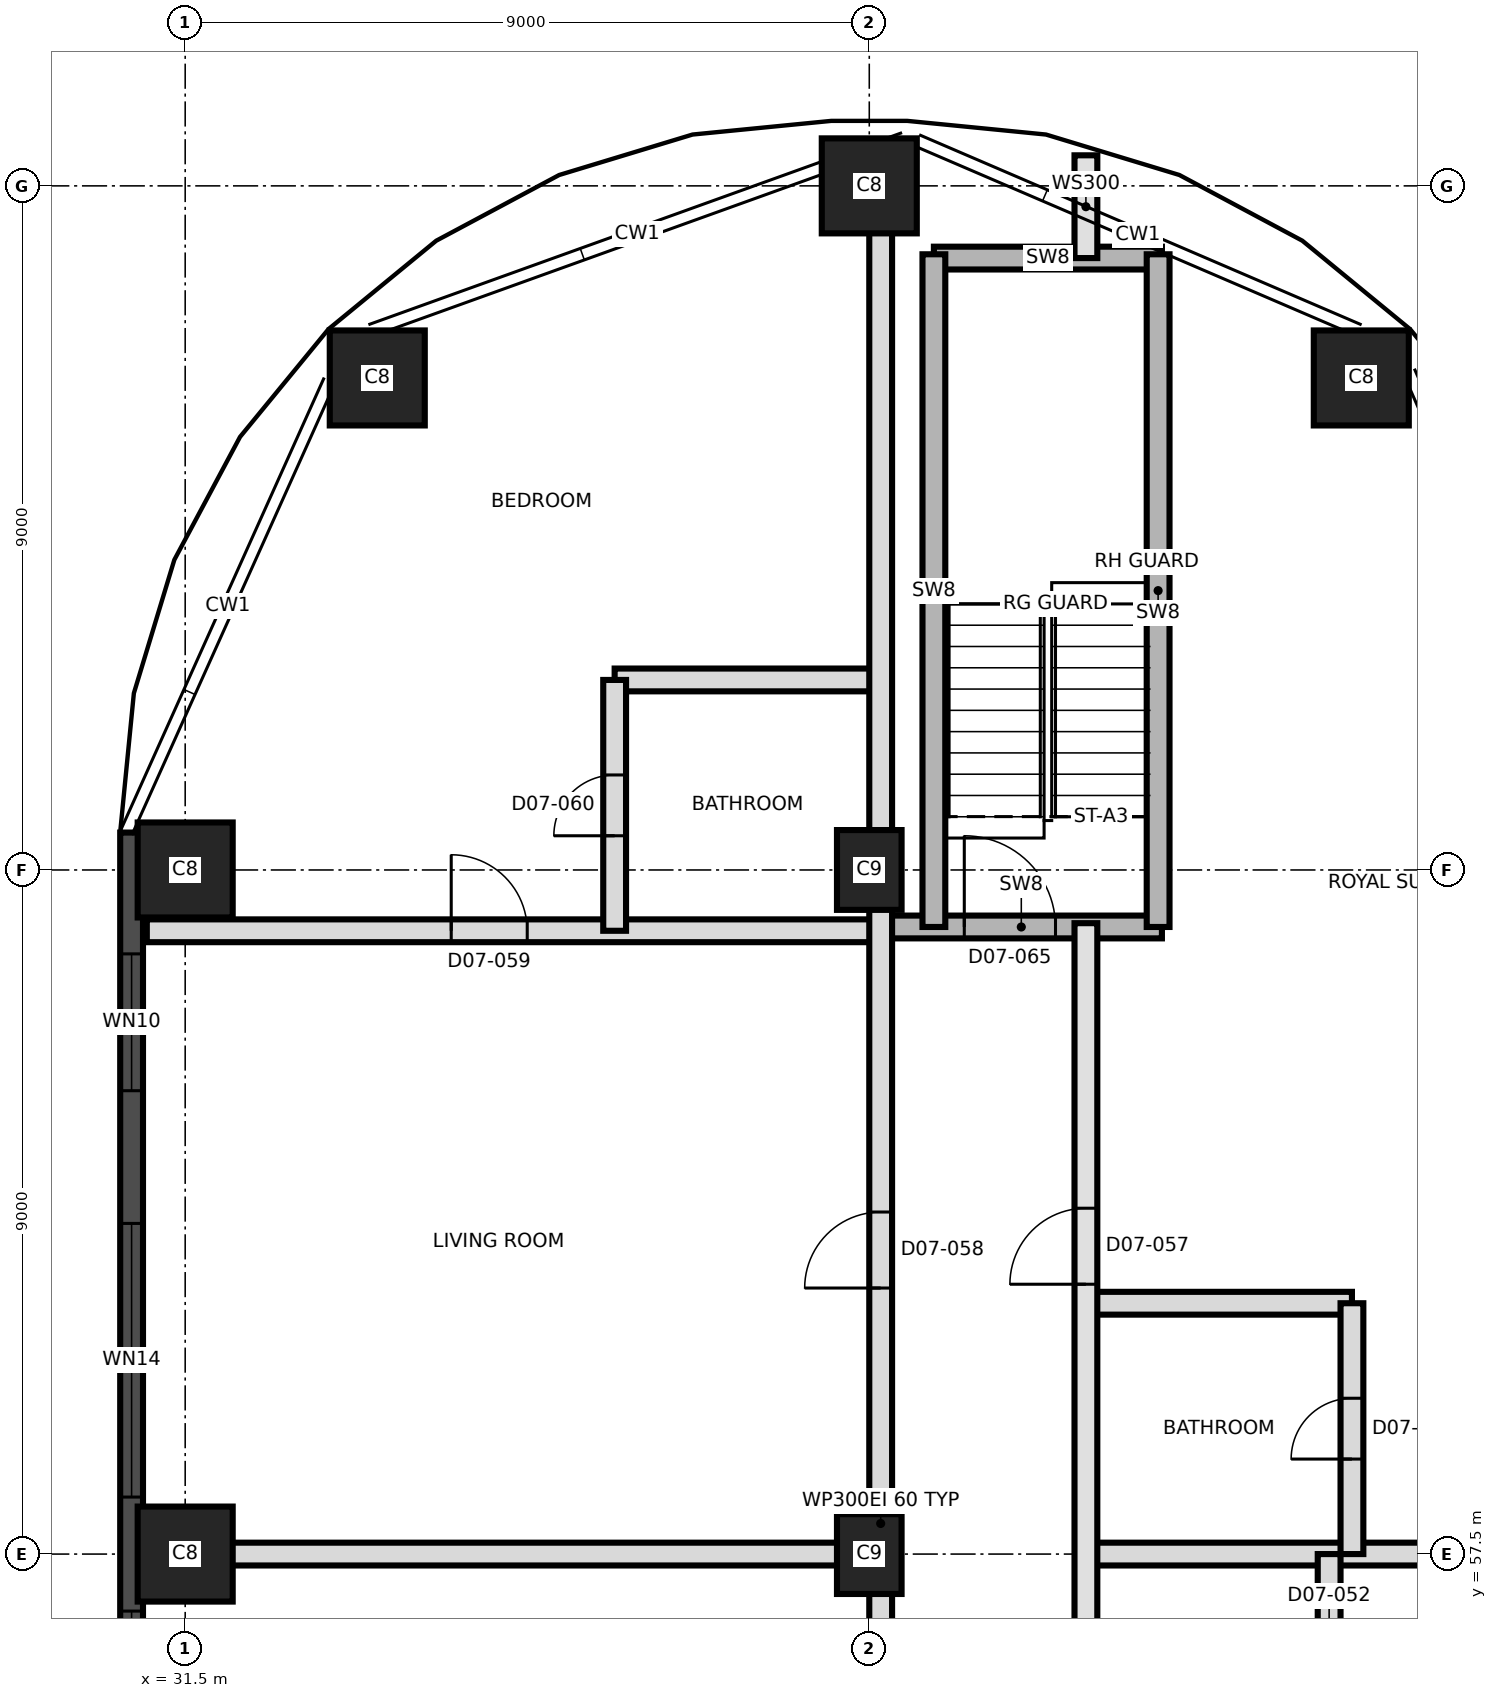
"""IFC4 building model, lengths in metres.
Left out: names, types, materials, properties, quantities, classifications, styles, units other than length and angle.
Written with IfcOpenShell. Run it as: python <this file> out.ifc"""

import sys

from ifc_helpers import new_model, si_unit, direction, frame, frame_2d, origin, origin_2d, place, context, subcontext, project, spatial, rectangle, extrude, element, fill, save


model = new_model("IFC4")
c1 = context("Model", 3, precision=1e-05, world=origin(), true_north=direction((0.0, 1.0)))
c2 = subcontext(c1, "Body", "Model", "MODEL_VIEW")
j1 = project(units=[si_unit("LENGTHUNIT", "METRE"), si_unit("PLANEANGLEUNIT", "RADIAN")], contexts=[c1])
p1 = place(None, origin())
s1 = spatial("IfcSite", under=j1, at=p1, CompositionType="ELEMENT")
p2 = place(p1, origin())
s2 = spatial("IfcBuilding", under=s1, at=p2, CompositionType="ELEMENT")
p3 = place(p2, frame((0.0, 0.0, 87.1)))
s3 = spatial("IfcBuildingStorey", under=s2, at=p3, CompositionType="ELEMENT", Elevation=87.1)
p4 = place(p3, frame((31.5, 57.5, 0.0), z_axis=(0.0, 0.0, 1.0), x_axis=(1.0, 0.0, 0.0)))
e1 = element("IfcColumn", 1, at=p4, inside=s3, PredefinedType="COLUMN", context=c2, shape_type="SweptSolid", body=[
    extrude(rectangle(XDim=1.25, YDim=1.25, at=origin_2d()), origin(), (0.0, 0.0, 1.0), 3.7),
])
p5 = place(p3, frame((40.5, 57.5, 0.0), z_axis=(0.0, 0.0, 1.0), x_axis=(0.0, 1.0, 0.0)))
e2 = element("IfcColumn", 2, at=p5, inside=s3, PredefinedType="COLUMN", context=c2, shape_type="SweptSolid", body=[
    extrude(rectangle(XDim=1.05, YDim=0.85, at=origin_2d()), origin(), (0.0, 0.0, 1.0), 3.7),
])
p6 = place(p3, frame((31.5, 66.5, 0.0), z_axis=(0.0, 0.0, 1.0), x_axis=(1.0, 0.0, 0.0)))
e3 = element("IfcColumn", 3, at=p6, inside=s3, PredefinedType="COLUMN", context=c2, shape_type="SweptSolid", body=[
    extrude(rectangle(XDim=1.25, YDim=1.25, at=origin_2d()), origin(), (0.0, 0.0, 1.0), 3.7),
])
p7 = place(p3, frame((40.5, 66.5, 0.0), z_axis=(0.0, 0.0, 1.0), x_axis=(0.0, 1.0, 0.0)))
e4 = element("IfcColumn", 4, at=p7, inside=s3, PredefinedType="COLUMN", context=c2, shape_type="SweptSolid", body=[
    extrude(rectangle(XDim=1.05, YDim=0.85, at=origin_2d()), origin(), (0.0, 0.0, 1.0), 3.7),
])
for number, where, z_axis, x_axis in (
    (5, (34.027, 72.973, 0.0), (0.0, 0.0, 1.0), (1.0, 0.0, 0.0)),
    (6, (46.973, 72.973, 0.0), (0.0, 0.0, 1.0), (1.0, 0.0, 0.0)),
    (7, (40.5, 75.5, 0.0), (0.0, 0.0, 1.0), (1.0, 0.0, 0.0)),
):
    element("IfcColumn", number, at=place(p3, frame(where, z_axis=z_axis, x_axis=x_axis)), inside=s3, PredefinedType="COLUMN", context=c2, shape_type="SweptSolid", body=[
        extrude(rectangle(XDim=1.25, YDim=1.25, at=origin_2d()), origin(), (0.0, 0.0, 1.0), 3.7),
    ])
p8 = place(p3, frame((30.795, 66.992, 0.0), z_axis=(0.0, 0.0, 1.0), x_axis=(0.0, -1.0, 0.0)))
e8 = element("IfcWall", 8, at=p8, inside=s3, PredefinedType="SOLIDWALL", context=c2, shape_type="SweptSolid", body=[
    extrude(rectangle(XDim=32.981, YDim=0.3, at=frame_2d((16.491, 0.0))), origin(), (0.0, 0.0, 1.0), 3.4),
])
p9 = place(p8, frame((1.596, 0.0, 0.3)))
e9 = element("IfcOpeningElement", 9, at=p9, cuts=e8, PredefinedType="OPENING", context=c2, shape_type="SweptSolid", body=[
    extrude(rectangle(XDim=1.8, YDim=2.4, at=frame_2d((0.9, 1.2))), frame((0.0, 0.16, 0.0), z_axis=(0.0, -1.0, 0.0), x_axis=(1.0, 0.0, 0.0)), (0.0, 0.0, 1.0), 0.32),
])
p10 = place(p8, frame((5.142, 0.0, 0.9)))
e10 = element("IfcOpeningElement", 10, at=p10, cuts=e8, PredefinedType="OPENING", context=c2, shape_type="SweptSolid", body=[
    extrude(rectangle(XDim=3.6, YDim=1.7, at=frame_2d((1.8, 0.85))), frame((0.0, 0.16, 0.0), z_axis=(0.0, -1.0, 0.0), x_axis=(1.0, 0.0, 0.0)), (0.0, 0.0, 1.0), 0.32),
])
p11 = place(p8, frame((10.242, 0.0, 0.9)))
e11 = element("IfcOpeningElement", 11, at=p11, cuts=e8, PredefinedType="OPENING", context=c2, shape_type="SweptSolid", body=[
    extrude(rectangle(XDim=3.6, YDim=1.7, at=frame_2d((1.8, 0.85))), frame((0.0, 0.16, 0.0), z_axis=(0.0, -1.0, 0.0), x_axis=(1.0, 0.0, 0.0)), (0.0, 0.0, 1.0), 0.32),
])
p12 = place(p8, frame((14.142, 0.0, 0.9)))
e12 = element("IfcOpeningElement", 12, at=p12, cuts=e8, PredefinedType="OPENING", context=c2, shape_type="SweptSolid", body=[
    extrude(rectangle(XDim=3.6, YDim=1.7, at=frame_2d((1.8, 0.85))), frame((0.0, 0.16, 0.0), z_axis=(0.0, -1.0, 0.0), x_axis=(1.0, 0.0, 0.0)), (0.0, 0.0, 1.0), 0.32),
])
p13 = place(p8, frame((19.242, 0.0, 0.9)))
e13 = element("IfcOpeningElement", 13, at=p13, cuts=e8, PredefinedType="OPENING", context=c2, shape_type="SweptSolid", body=[
    extrude(rectangle(XDim=3.6, YDim=1.7, at=frame_2d((1.8, 0.85))), frame((0.0, 0.16, 0.0), z_axis=(0.0, -1.0, 0.0), x_axis=(1.0, 0.0, 0.0)), (0.0, 0.0, 1.0), 0.32),
])
p14 = place(p8, frame((23.142, 0.0, 0.9)))
e14 = element("IfcOpeningElement", 14, at=p14, cuts=e8, PredefinedType="OPENING", context=c2, shape_type="SweptSolid", body=[
    extrude(rectangle(XDim=4.2, YDim=1.7, at=frame_2d((2.1, 0.85))), frame((0.0, 0.16, 0.0), z_axis=(0.0, -1.0, 0.0), x_axis=(1.0, 0.0, 0.0)), (0.0, 0.0, 1.0), 0.32),
])
p15 = place(p8, frame((29.337, 0.0, 0.3)))
e15 = element("IfcOpeningElement", 15, at=p15, cuts=e8, PredefinedType="OPENING", context=c2, shape_type="SweptSolid", body=[
    extrude(rectangle(XDim=1.8, YDim=2.4, at=frame_2d((0.9, 1.2))), frame((0.0, 0.16, 0.0), z_axis=(0.0, -1.0, 0.0), x_axis=(1.0, 0.0, 0.0)), (0.0, 0.0, 1.0), 0.32),
])
p16 = place(p3, frame((30.995, 57.5, 0.0), z_axis=(0.0, 0.0, 1.0), x_axis=(1.0, 0.0, 0.0)))
e16 = element("IfcWall", 16, at=p16, inside=s3, PredefinedType="PARTITIONING", context=c2, shape_type="SweptSolid", body=[
    extrude(rectangle(XDim=9.655, YDim=0.3, at=frame_2d((4.827, 0.0))), origin(), (0.0, 0.0, 1.0), 3.4),
])
p17 = place(p3, frame((43.35, 57.5, 0.0), z_axis=(0.0, 0.0, 1.0), x_axis=(1.0, 0.0, 0.0)))
e17 = element("IfcWall", 17, at=p17, inside=s3, PredefinedType="PARTITIONING", context=c2, shape_type="SweptSolid", body=[
    extrude(rectangle(XDim=6.655, YDim=0.3, at=frame_2d((3.327, 0.0))), origin(), (0.0, 0.0, 1.0), 3.4),
])
p18 = place(p3, frame((43.35, 60.8, 0.0), z_axis=(0.0, 0.0, 1.0), x_axis=(1.0, 0.0, 0.0)))
e18 = element("IfcWall", 18, at=p18, inside=s3, PredefinedType="PARTITIONING", context=c2, shape_type="SweptSolid", body=[
    extrude(rectangle(XDim=3.5, YDim=0.3, at=frame_2d((1.75, 0.0))), origin(), (0.0, 0.0, 1.0), 3.4),
])
p19 = place(p3, frame((30.995, 65.7, 0.0), z_axis=(0.0, 0.0, 1.0), x_axis=(1.0, 0.0, 0.0)))
e19 = element("IfcWall", 19, at=p19, inside=s3, PredefinedType="PARTITIONING", context=c2, shape_type="SweptSolid", body=[
    extrude(rectangle(XDim=9.655, YDim=0.3, at=frame_2d((4.827, 0.0))), origin(), (0.0, 0.0, 1.0), 3.4),
])
p20 = place(p19, frame((4.005, 0.0, 0.0)))
e20 = element("IfcOpeningElement", 20, at=p20, cuts=e19, PredefinedType="OPENING", context=c2, shape_type="SweptSolid", body=[
    extrude(rectangle(XDim=1.0, YDim=2.1, at=frame_2d((0.5, 1.05))), frame((0.0, 0.16, 0.0), z_axis=(0.0, -1.0, 0.0), x_axis=(1.0, 0.0, 0.0)), (0.0, 0.0, 1.0), 0.32),
])
p21 = place(p3, frame((40.65, 65.75, 0.0), z_axis=(0.0, 0.0, 1.0), x_axis=(1.0, 0.0, 0.0)))
e21 = element("IfcWall", 21, at=p21, inside=s3, PredefinedType="SHEAR", context=c2, shape_type="SweptSolid", body=[
    extrude(rectangle(XDim=3.7, YDim=0.3, at=frame_2d((1.85, 0.0))), origin(), (0.0, 0.0, 1.0), 3.4),
])
p22 = place(p21, frame((1.1, 0.0, 0.0)))
e22 = element("IfcOpeningElement", 22, at=p22, cuts=e21, PredefinedType="OPENING", context=c2, shape_type="SweptSolid", body=[
    extrude(rectangle(XDim=1.2, YDim=2.1, at=frame_2d((0.6, 1.05))), frame((0.0, 0.16, 0.0), z_axis=(0.0, -1.0, 0.0), x_axis=(1.0, 0.0, 0.0)), (0.0, 0.0, 1.0), 0.32),
])
p23 = place(p3, frame((37.15, 69.0, 0.0), z_axis=(0.0, 0.0, 1.0), x_axis=(1.0, 0.0, 0.0)))
e23 = element("IfcWall", 23, at=p23, inside=s3, PredefinedType="PARTITIONING", context=c2, shape_type="SweptSolid", body=[
    extrude(rectangle(XDim=3.5, YDim=0.3, at=frame_2d((1.75, 0.0))), origin(), (0.0, 0.0, 1.0), 3.4),
])
p24 = place(p3, frame((41.35, 74.55, 0.0), z_axis=(0.0, 0.0, 1.0), x_axis=(1.0, 0.0, 0.0)))
e24 = element("IfcWall", 24, at=p24, inside=s3, PredefinedType="SHEAR", context=c2, shape_type="SweptSolid", body=[
    extrude(rectangle(XDim=3.0, YDim=0.3, at=frame_2d((1.5, 0.0))), origin(), (0.0, 0.0, 1.0), 3.4),
])
p25 = place(p3, frame((37.15, 65.7, 0.0), z_axis=(0.0, 0.0, 1.0), x_axis=(0.0, 1.0, 0.0)))
e25 = element("IfcWall", 25, at=p25, inside=s3, PredefinedType="PARTITIONING", context=c2, shape_type="SweptSolid", body=[
    extrude(rectangle(XDim=3.3, YDim=0.3, at=frame_2d((1.65, 0.0))), origin(), (0.0, 0.0, 1.0), 3.4),
])
p26 = place(p25, frame((1.25, 0.0, 0.0)))
e26 = element("IfcOpeningElement", 26, at=p26, cuts=e25, PredefinedType="OPENING", context=c2, shape_type="SweptSolid", body=[
    extrude(rectangle(XDim=0.8, YDim=2.1, at=frame_2d((0.4, 1.05))), frame((0.0, 0.16, 0.0), z_axis=(0.0, -1.0, 0.0), x_axis=(1.0, 0.0, 0.0)), (0.0, 0.0, 1.0), 0.32),
])
p27 = place(p3, frame((40.65, 39.8, 0.0), z_axis=(0.0, 0.0, 1.0), x_axis=(0.0, 1.0, 0.0)))
e27 = element("IfcWall", 27, at=p27, inside=s3, PredefinedType="PARTITIONING", context=c2, shape_type="SweptSolid", body=[
    extrude(rectangle(XDim=36.205, YDim=0.3, at=frame_2d((18.103, 0.0))), origin(), (0.0, 0.0, 1.0), 3.4),
])
p28 = place(p27, frame((0.835, 0.0, 0.0)))
e28 = element("IfcOpeningElement", 28, at=p28, cuts=e27, PredefinedType="OPENING", context=c2, shape_type="SweptSolid", body=[
    extrude(rectangle(XDim=1.2, YDim=2.1, at=frame_2d((0.6, 1.05))), frame((0.0, 0.16, 0.0), z_axis=(0.0, -1.0, 0.0), x_axis=(1.0, 0.0, 0.0)), (0.0, 0.0, 1.0), 0.32),
])
p29 = place(p27, frame((4.085, 0.0, 0.0)))
e29 = element("IfcOpeningElement", 29, at=p29, cuts=e27, PredefinedType="OPENING", context=c2, shape_type="SweptSolid", body=[
    extrude(rectangle(XDim=1.0, YDim=2.1, at=frame_2d((0.5, 1.05))), frame((0.0, 0.16, 0.0), z_axis=(0.0, -1.0, 0.0), x_axis=(1.0, 0.0, 0.0)), (0.0, 0.0, 1.0), 0.32),
])
p30 = place(p27, frame((14.35, 0.0, 0.0)))
e30 = element("IfcOpeningElement", 30, at=p30, cuts=e27, PredefinedType="OPENING", context=c2, shape_type="SweptSolid", body=[
    extrude(rectangle(XDim=1.0, YDim=2.4, at=frame_2d((0.5, 1.2))), frame((0.0, 0.16, 0.0), z_axis=(0.0, -1.0, 0.0), x_axis=(1.0, 0.0, 0.0)), (0.0, 0.0, 1.0), 0.32),
])
p31 = place(p27, frame((21.2, 0.0, 0.0)))
e31 = element("IfcOpeningElement", 31, at=p31, cuts=e27, PredefinedType="OPENING", context=c2, shape_type="SweptSolid", body=[
    extrude(rectangle(XDim=1.0, YDim=2.4, at=frame_2d((0.5, 1.2))), frame((0.0, 0.16, 0.0), z_axis=(0.0, -1.0, 0.0), x_axis=(1.0, 0.0, 0.0)), (0.0, 0.0, 1.0), 0.32),
])
p32 = place(p3, frame((41.35, 65.75, 0.0), z_axis=(0.0, 0.0, 1.0), x_axis=(0.0, 1.0, 0.0)))
e32 = element("IfcWall", 32, at=p32, inside=s3, PredefinedType="SHEAR", context=c2, shape_type="SweptSolid", body=[
    extrude(rectangle(XDim=8.85, YDim=0.3, at=frame_2d((4.425, 0.0))), origin(), (0.0, 0.0, 1.0), 3.4),
])
p33 = place(p3, frame((43.35, 39.8, 0.0), z_axis=(0.0, 0.0, 1.0), x_axis=(0.0, 1.0, 0.0)))
e33 = element("IfcWall", 33, at=p33, inside=s3, PredefinedType="SOLIDWALL", context=c2, shape_type="SweptSolid", body=[
    extrude(rectangle(XDim=26.0, YDim=0.3, at=frame_2d((13.0, 0.0))), origin(), (0.0, 0.0, 1.0), 3.4),
])
p34 = place(p33, frame((3.115, 0.0, 0.0)))
e34 = element("IfcOpeningElement", 34, at=p34, cuts=e33, PredefinedType="OPENING", context=c2, shape_type="SweptSolid", body=[
    extrude(rectangle(XDim=1.0, YDim=2.1, at=frame_2d((0.5, 1.05))), frame((0.0, 0.16, 0.0), z_axis=(0.0, -1.0, 0.0), x_axis=(1.0, 0.0, 0.0)), (0.0, 0.0, 1.0), 0.32),
])
p35 = place(p33, frame((6.065, 0.0, 0.0)))
e35 = element("IfcOpeningElement", 35, at=p35, cuts=e33, PredefinedType="OPENING", context=c2, shape_type="SweptSolid", body=[
    extrude(rectangle(XDim=1.4, YDim=2.1, at=frame_2d((0.7, 1.05))), frame((0.0, 0.16, 0.0), z_axis=(0.0, -1.0, 0.0), x_axis=(1.0, 0.0, 0.0)), (0.0, 0.0, 1.0), 0.32),
])
p36 = place(p33, frame((9.835, 0.0, 0.0)))
e36 = element("IfcOpeningElement", 36, at=p36, cuts=e33, PredefinedType="OPENING", context=c2, shape_type="SweptSolid", body=[
    extrude(rectangle(XDim=1.2, YDim=2.1, at=frame_2d((0.6, 1.05))), frame((0.0, 0.16, 0.0), z_axis=(0.0, -1.0, 0.0), x_axis=(1.0, 0.0, 0.0)), (0.0, 0.0, 1.0), 0.32),
])
p37 = place(p33, frame((13.085, 0.0, 0.0)))
e37 = element("IfcOpeningElement", 37, at=p37, cuts=e33, PredefinedType="OPENING", context=c2, shape_type="SweptSolid", body=[
    extrude(rectangle(XDim=1.0, YDim=2.1, at=frame_2d((0.5, 1.05))), frame((0.0, 0.16, 0.0), z_axis=(0.0, -1.0, 0.0), x_axis=(1.0, 0.0, 0.0)), (0.0, 0.0, 1.0), 0.32),
])
p38 = place(p33, frame((21.25, 0.0, 0.0)))
e38 = element("IfcOpeningElement", 38, at=p38, cuts=e33, PredefinedType="OPENING", context=c2, shape_type="SweptSolid", body=[
    extrude(rectangle(XDim=1.0, YDim=2.4, at=frame_2d((0.5, 1.2))), frame((0.0, 0.16, 0.0), z_axis=(0.0, -1.0, 0.0), x_axis=(1.0, 0.0, 0.0)), (0.0, 0.0, 1.0), 0.32),
])
p39 = place(p3, frame((43.35, 74.55, 0.0), z_axis=(0.0, 0.0, 1.0), x_axis=(0.0, 1.0, 0.0)))
e39 = element("IfcWall", 39, at=p39, inside=s3, PredefinedType="SOLIDWALL", context=c2, shape_type="SweptSolid", body=[
    extrude(rectangle(XDim=1.352, YDim=0.3, at=frame_2d((0.676, 0.0))), origin(), (0.0, 0.0, 1.0), 3.4),
])
p40 = place(p3, frame((44.3, 65.75, 0.0), z_axis=(0.0, 0.0, 1.0), x_axis=(0.0, 1.0, 0.0)))
e40 = element("IfcWall", 40, at=p40, inside=s3, PredefinedType="SHEAR", context=c2, shape_type="SweptSolid", body=[
    extrude(rectangle(XDim=8.85, YDim=0.3, at=frame_2d((4.425, 0.0))), origin(), (0.0, 0.0, 1.0), 3.4),
])
p41 = place(p3, frame((46.55, 54.8, 0.0), z_axis=(0.0, 0.0, 1.0), x_axis=(0.0, 1.0, 0.0)))
e41 = element("IfcWall", 41, at=p41, inside=s3, PredefinedType="PARTITIONING", context=c2, shape_type="SweptSolid", body=[
    extrude(rectangle(XDim=2.7, YDim=0.3, at=frame_2d((1.35, 0.0))), origin(), (0.0, 0.0, 1.0), 3.4),
])
p42 = place(p41, frame((0.95, 0.0, 0.0)))
e42 = element("IfcOpeningElement", 42, at=p42, cuts=e41, PredefinedType="OPENING", context=c2, shape_type="SweptSolid", body=[
    extrude(rectangle(XDim=0.8, YDim=2.1, at=frame_2d((0.4, 1.05))), frame((0.0, 0.16, 0.0), z_axis=(0.0, -1.0, 0.0), x_axis=(1.0, 0.0, 0.0)), (0.0, 0.0, 1.0), 0.32),
])
p43 = place(p3, frame((46.85, 57.5, 0.0), z_axis=(0.0, 0.0, 1.0), x_axis=(0.0, 1.0, 0.0)))
e43 = element("IfcWall", 43, at=p43, inside=s3, PredefinedType="PARTITIONING", context=c2, shape_type="SweptSolid", body=[
    extrude(rectangle(XDim=3.3, YDim=0.3, at=frame_2d((1.65, 0.0))), origin(), (0.0, 0.0, 1.0), 3.4),
])
p44 = place(p43, frame((1.25, 0.0, 0.0)))
e44 = element("IfcOpeningElement", 44, at=p44, cuts=e43, PredefinedType="OPENING", context=c2, shape_type="SweptSolid", body=[
    extrude(rectangle(XDim=0.8, YDim=2.1, at=frame_2d((0.4, 1.05))), frame((0.0, 0.16, 0.0), z_axis=(0.0, -1.0, 0.0), x_axis=(1.0, 0.0, 0.0)), (0.0, 0.0, 1.0), 0.32),
])
p45 = place(p9, origin())
e45 = element("IfcWindow", 45, at=p45, inside=s3, PartitioningType="SINGLE_PANEL", PredefinedType="WINDOW", context=c2, shape_type="SweptSolid", body=[
    extrude(rectangle(XDim=1.8, YDim=2.4, at=frame_2d((0.9, 1.2))), frame((0.0, 0.03, 0.0), z_axis=(0.0, -1.0, 0.0), x_axis=(1.0, 0.0, 0.0)), (0.0, 0.0, 1.0), 0.06),
])
fill(e9, e45)
p46 = place(p10, origin())
e46 = element("IfcWindow", 46, at=p46, inside=s3, PartitioningType="SINGLE_PANEL", PredefinedType="WINDOW", context=c2, shape_type="SweptSolid", body=[
    extrude(rectangle(XDim=3.6, YDim=1.7, at=frame_2d((1.8, 0.85))), frame((0.0, 0.03, 0.0), z_axis=(0.0, -1.0, 0.0), x_axis=(1.0, 0.0, 0.0)), (0.0, 0.0, 1.0), 0.06),
])
fill(e10, e46)
p47 = place(p11, origin())
e47 = element("IfcWindow", 47, at=p47, inside=s3, PartitioningType="SINGLE_PANEL", PredefinedType="WINDOW", context=c2, shape_type="SweptSolid", body=[
    extrude(rectangle(XDim=3.6, YDim=1.7, at=frame_2d((1.8, 0.85))), frame((0.0, 0.03, 0.0), z_axis=(0.0, -1.0, 0.0), x_axis=(1.0, 0.0, 0.0)), (0.0, 0.0, 1.0), 0.06),
])
fill(e11, e47)
p48 = place(p44, origin())
e48 = element("IfcDoor", 48, at=p48, inside=s3, OperationType="SINGLE_SWING_LEFT", PredefinedType="DOOR", context=c2, shape_type="SweptSolid", body=[
    extrude(rectangle(XDim=0.8, YDim=2.1, at=frame_2d((0.4, 1.05))), frame((0.0, 0.025, 0.0), z_axis=(0.0, -1.0, 0.0), x_axis=(1.0, 0.0, 0.0)), (0.0, 0.0, 1.0), 0.05),
])
fill(e44, e48)
p49 = place(p38, origin())
e49 = element("IfcDoor", 49, at=p49, inside=s3, OperationType="SINGLE_SWING_LEFT", PredefinedType="DOOR", context=c2, shape_type="SweptSolid", body=[
    extrude(rectangle(XDim=1.0, YDim=2.4, at=frame_2d((0.5, 1.2))), frame((0.0, 0.025, 0.0), z_axis=(0.0, -1.0, 0.0), x_axis=(1.0, 0.0, 0.0)), (0.0, 0.0, 1.0), 0.05),
])
fill(e38, e49)
p50 = place(p31, origin())
e50 = element("IfcDoor", 50, at=p50, inside=s3, OperationType="SINGLE_SWING_RIGHT", PredefinedType="DOOR", context=c2, shape_type="SweptSolid", body=[
    extrude(rectangle(XDim=1.0, YDim=2.4, at=frame_2d((0.5, 1.2))), frame((0.0, 0.025, 0.0), z_axis=(0.0, -1.0, 0.0), x_axis=(1.0, 0.0, 0.0)), (0.0, 0.0, 1.0), 0.05),
])
fill(e31, e50)
p51 = place(p20, origin())
e51 = element("IfcDoor", 51, at=p51, inside=s3, OperationType="SINGLE_SWING_LEFT", PredefinedType="DOOR", context=c2, shape_type="SweptSolid", body=[
    extrude(rectangle(XDim=1.0, YDim=2.1, at=frame_2d((0.5, 1.05))), frame((0.0, 0.025, 0.0), z_axis=(0.0, -1.0, 0.0), x_axis=(1.0, 0.0, 0.0)), (0.0, 0.0, 1.0), 0.05),
])
fill(e20, e51)
p52 = place(p26, origin())
e52 = element("IfcDoor", 52, at=p52, inside=s3, OperationType="SINGLE_SWING_LEFT", PredefinedType="DOOR", context=c2, shape_type="SweptSolid", body=[
    extrude(rectangle(XDim=0.8, YDim=2.1, at=frame_2d((0.4, 1.05))), frame((0.0, 0.025, 0.0), z_axis=(0.0, -1.0, 0.0), x_axis=(1.0, 0.0, 0.0)), (0.0, 0.0, 1.0), 0.05),
])
fill(e26, e52)
p53 = place(p22, origin())
e53 = element("IfcDoor", 53, at=p53, inside=s3, OperationType="SINGLE_SWING_RIGHT", PredefinedType="DOOR", context=c2, shape_type="SweptSolid", body=[
    extrude(rectangle(XDim=1.2, YDim=2.1, at=frame_2d((0.6, 1.05))), frame((0.0, 0.025, 0.0), z_axis=(0.0, -1.0, 0.0), x_axis=(1.0, 0.0, 0.0)), (0.0, 0.0, 1.0), 0.05),
])
fill(e22, e53)
save(model, sys.argv[1])
